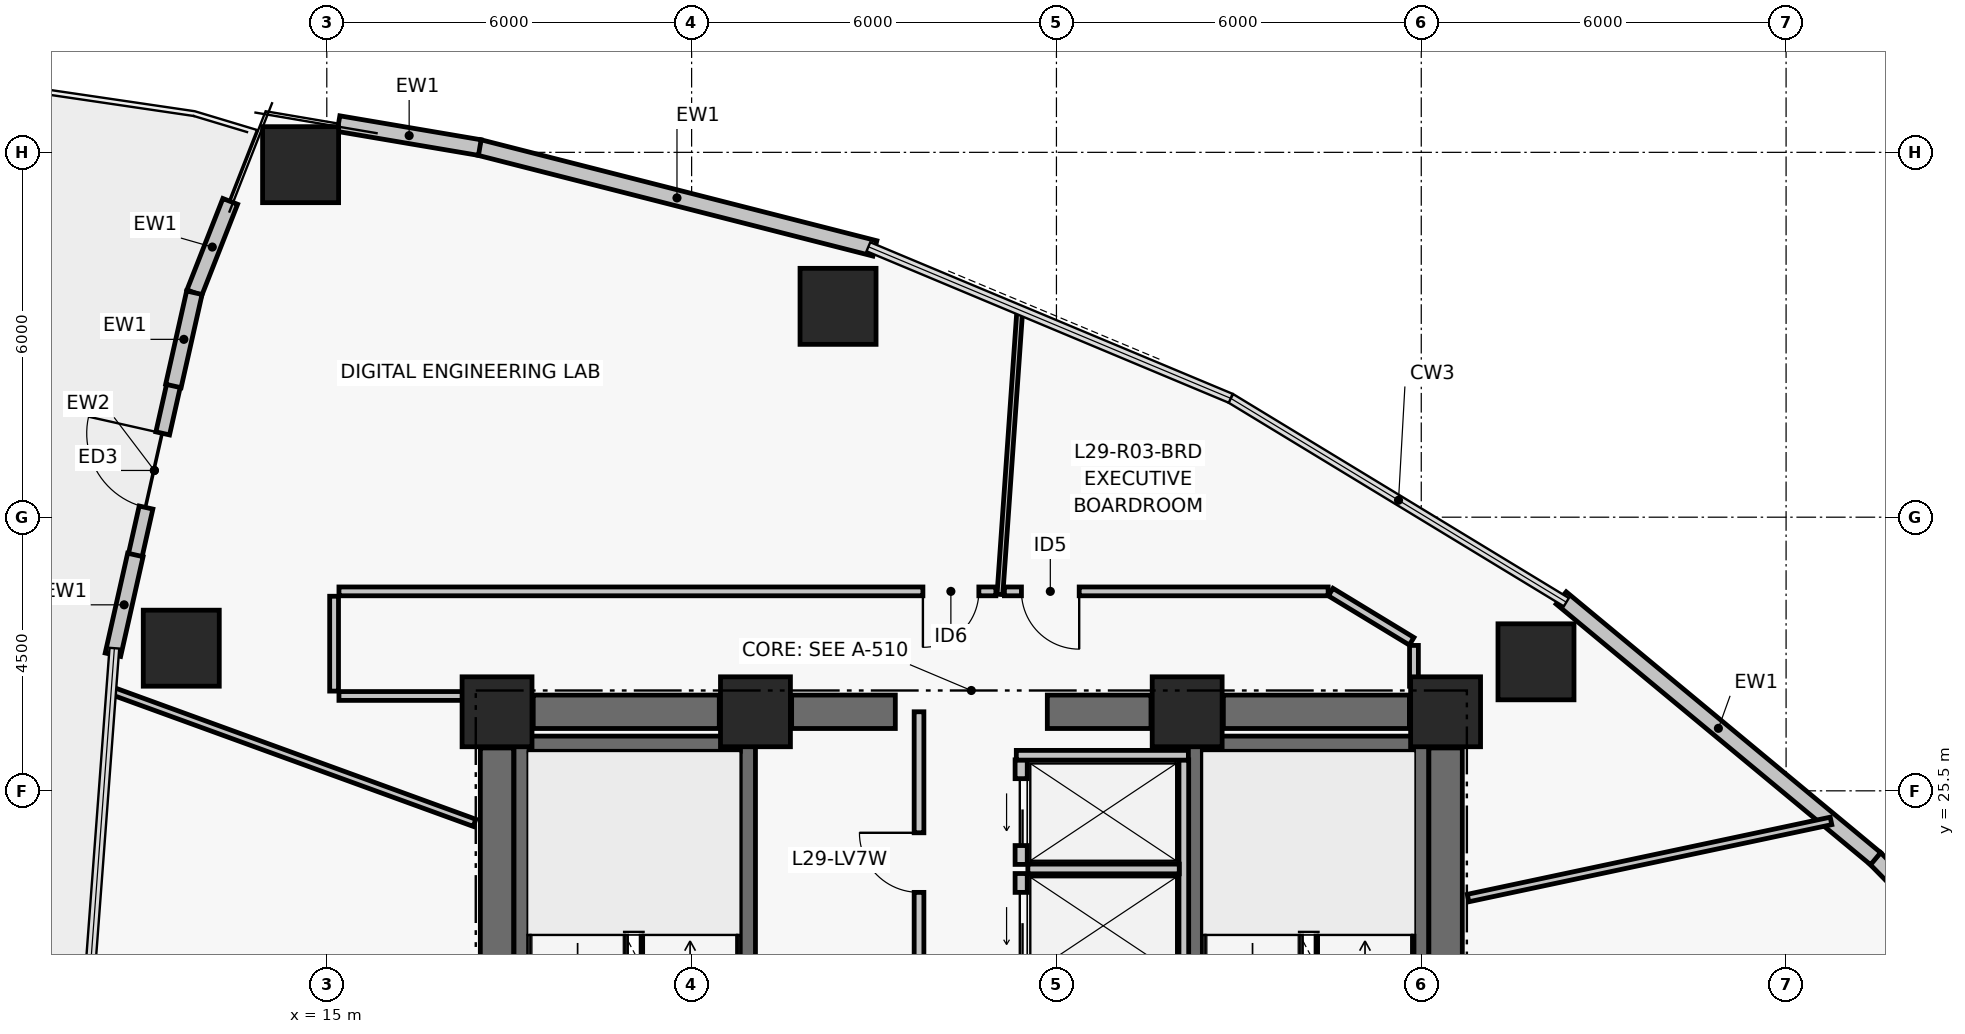
"""IFC4 building model, lengths in metres.
Left out: names, types, materials, properties, quantities, classifications, styles, units other than length and angle.
Written with IfcOpenShell. Run it as: python <this file> out.ifc"""

import sys

from ifc_helpers import new_model, si_unit, direction, frame, frame_2d, origin, origin_2d, place, context, subcontext, project, spatial, rectangle, hollow_rectangle, extrude, element, fill, save


model = new_model("IFC4")
c1 = context("Model", 3, precision=1e-05, world=origin(), true_north=direction((0.0, 1.0)))
c2 = subcontext(c1, "Body", "Model", "MODEL_VIEW")
j1 = project(units=[si_unit("LENGTHUNIT", "METRE"), si_unit("PLANEANGLEUNIT", "RADIAN")], contexts=[c1])
p1 = place(None, origin())
s1 = spatial("IfcSite", under=j1, at=p1, CompositionType="ELEMENT")
p2 = place(p1, origin())
s2 = spatial("IfcBuilding", under=s1, at=p2, CompositionType="ELEMENT")
p3 = place(p2, frame((0.0, 0.0, 118.86)))
s3 = spatial("IfcBuildingStorey", under=s2, at=p3, CompositionType="ELEMENT", Elevation=118.86)
for number, where, z_axis, x_axis in (
    (1, (17.8, 26.8, 0.0), (0.0, 0.0, 1.0), (1.0, 0.0, 0.0)),
    (2, (22.05, 26.8, 0.0), (0.0, 0.0, 1.0), (1.0, 0.0, 0.0)),
    (3, (29.15, 26.8, 0.0), (0.0, 0.0, 1.0), (1.0, 0.0, 0.0)),
    (4, (33.4, 26.8, 0.0), (0.0, 0.0, 1.0), (1.0, 0.0, 0.0)),
):
    element("IfcColumn", number, at=place(p3, frame(where, z_axis=z_axis, x_axis=x_axis)), inside=s3, PredefinedType="COLUMN", context=c2, shape_type="SweptSolid", body=[
        extrude(rectangle(XDim=1.15, YDim=1.15, at=origin_2d()), origin(), (0.0, 0.0, 1.0), 3.72),
    ])
p4 = place(p3, frame((18.395, 26.8, 0.0), z_axis=(0.0, 0.0, 1.0), x_axis=(1.0, 0.0, 0.0)))
e5 = element("IfcWall", 5, at=p4, inside=s3, PredefinedType="SHEAR", context=c2, shape_type="SweptSolid", body=[
    extrude(rectangle(XDim=3.06, YDim=0.55, at=frame_2d((1.53, 0.0))), origin(), (0.0, 0.0, 1.0), 3.47),
])
p5 = place(p3, frame((22.645, 26.8, 0.0), z_axis=(0.0, 0.0, 1.0), x_axis=(1.0, 0.0, 0.0)))
e6 = element("IfcWall", 6, at=p5, inside=s3, PredefinedType="SHEAR", context=c2, shape_type="SweptSolid", body=[
    extrude(rectangle(XDim=1.705, YDim=0.55, at=frame_2d((0.853, 0.0))), origin(), (0.0, 0.0, 1.0), 3.47),
])
p6 = place(p3, frame((26.85, 26.8, 0.0), z_axis=(0.0, 0.0, 1.0), x_axis=(1.0, 0.0, 0.0)))
e7 = element("IfcWall", 7, at=p6, inside=s3, PredefinedType="SHEAR", context=c2, shape_type="SweptSolid", body=[
    extrude(rectangle(XDim=1.705, YDim=0.55, at=frame_2d((0.853, 0.0))), origin(), (0.0, 0.0, 1.0), 3.47),
])
p7 = place(p3, frame((29.745, 26.8, 0.0), z_axis=(0.0, 0.0, 1.0), x_axis=(1.0, 0.0, 0.0)))
e8 = element("IfcWall", 8, at=p7, inside=s3, PredefinedType="SHEAR", context=c2, shape_type="SweptSolid", body=[
    extrude(rectangle(XDim=3.06, YDim=0.55, at=frame_2d((1.53, 0.0))), origin(), (0.0, 0.0, 1.0), 3.47),
])
for number, where, z_axis, x_axis in (
    (9, (17.8, 17.795, 0.0), (0.0, 0.0, 1.0), (0.0, 1.0, 0.0)),
    (10, (33.4, 17.795, 0.0), (0.0, 0.0, 1.0), (0.0, 1.0, 0.0)),
):
    element("IfcWall", number, at=place(p3, frame(where, z_axis=z_axis, x_axis=x_axis)), inside=s3, PredefinedType="SHEAR", context=c2, shape_type="SweptSolid", body=[
        extrude(rectangle(XDim=8.41, YDim=0.55, at=frame_2d((4.205, 0.0))), origin(), (0.0, 0.0, 1.0), 3.47),
    ])
p8 = place(p3, frame((18.204, 17.6, 0.0), z_axis=(0.0, 0.0, 1.0), x_axis=(0.0, 1.0, 0.0)))
e11 = element("IfcWall", 11, at=p8, inside=s3, PredefinedType="SHEAR", context=c2, shape_type="SweptSolid", body=[
    extrude(rectangle(XDim=8.8, YDim=0.25, at=frame_2d((4.4, 0.0))), origin(), (0.0, 0.0, 1.0), 3.47),
])
p9 = place(p3, frame((21.925, 17.6, 0.0), z_axis=(0.0, 0.0, 1.0), x_axis=(0.0, 1.0, 0.0)))
e12 = element("IfcWall", 12, at=p9, inside=s3, PredefinedType="SHEAR", context=c2, shape_type="SweptSolid", body=[
    extrude(rectangle(XDim=8.8, YDim=0.25, at=frame_2d((4.4, 0.0))), origin(), (0.0, 0.0, 1.0), 3.47),
])
p10 = place(p9, frame((0.35, 0.0, 0.0)))
e13 = element("IfcOpeningElement", 13, at=p10, cuts=e12, PredefinedType="OPENING", context=c2, shape_type="SweptSolid", body=[
    extrude(rectangle(XDim=1.05, YDim=2.08, at=frame_2d((0.525, 1.04))), frame((0.0, 0.135, 0.0), z_axis=(0.0, -1.0, 0.0), x_axis=(1.0, 0.0, 0.0)), (0.0, 0.0, 1.0), 0.27),
])
p11 = place(p3, frame((18.329, 26.275, 0.0), z_axis=(0.0, 0.0, 1.0), x_axis=(1.0, 0.0, 0.0)))
e14 = element("IfcWall", 14, at=p11, inside=s3, PredefinedType="SHEAR", context=c2, shape_type="SweptSolid", body=[
    extrude(rectangle(XDim=3.471, YDim=0.25, at=frame_2d((1.735, 0.0))), origin(), (0.0, 0.0, 1.0), 3.47),
])
p12 = place(p3, frame((29.275, 17.6, 0.0), z_axis=(0.0, 0.0, 1.0), x_axis=(0.0, 1.0, 0.0)))
e15 = element("IfcWall", 15, at=p12, inside=s3, PredefinedType="SHEAR", context=c2, shape_type="SweptSolid", body=[
    extrude(rectangle(XDim=8.8, YDim=0.25, at=frame_2d((4.4, 0.0))), origin(), (0.0, 0.0, 1.0), 3.47),
])
p13 = place(p12, frame((0.35, 0.0, 0.0)))
e16 = element("IfcOpeningElement", 16, at=p13, cuts=e15, PredefinedType="OPENING", context=c2, shape_type="SweptSolid", body=[
    extrude(rectangle(XDim=1.05, YDim=2.08, at=frame_2d((0.525, 1.04))), frame((0.0, 0.135, 0.0), z_axis=(0.0, -1.0, 0.0), x_axis=(1.0, 0.0, 0.0)), (0.0, 0.0, 1.0), 0.27),
])
p14 = place(p3, frame((32.996, 17.6, 0.0), z_axis=(0.0, 0.0, 1.0), x_axis=(0.0, 1.0, 0.0)))
e17 = element("IfcWall", 17, at=p14, inside=s3, PredefinedType="SHEAR", context=c2, shape_type="SweptSolid", body=[
    extrude(rectangle(XDim=8.8, YDim=0.25, at=frame_2d((4.4, 0.0))), origin(), (0.0, 0.0, 1.0), 3.47),
])
p15 = place(p3, frame((29.4, 26.275, 0.0), z_axis=(0.0, 0.0, 1.0), x_axis=(1.0, 0.0, 0.0)))
e18 = element("IfcWall", 18, at=p15, inside=s3, PredefinedType="SHEAR", context=c2, shape_type="SweptSolid", body=[
    extrude(rectangle(XDim=3.471, YDim=0.25, at=frame_2d((1.736, 0.0))), origin(), (0.0, 0.0, 1.0), 3.47),
])
for number, where, z_axis, x_axis in (
    (19, (34.887, 27.622, 0.0), (0.0, 0.0, 1.0), (1.0, 0.0, 0.0)),
    (20, (23.408, 33.467, 0.0), (0.0, 0.0, 1.0), (1.0, 0.0, 0.0)),
    (21, (14.569, 35.797, 0.0), (0.0, 0.0, 1.0), (1.0, 0.0, 0.0)),
    (22, (12.607, 27.846, 0.0), (0.0, 0.0, 1.0), (1.0, 0.0, 0.0)),
):
    element("IfcColumn", number, at=place(p3, frame(where, z_axis=z_axis, x_axis=x_axis)), inside=s3, PredefinedType="COLUMN", context=c2, shape_type="SweptSolid", body=[
        extrude(hollow_rectangle(XDim=1.25, YDim=1.25, WallThickness=0.05, at=origin_2d()), origin(), (0.0, 0.0, 1.0), 3.72),
    ])
p16 = place(p3, frame((11.849, 29.368, 0.0), z_axis=(0.0, 0.0, 1.0), x_axis=(0.219504103435, 0.975611576692, 0.0)))
e23 = element("IfcWall", 23, at=p16, inside=s3, PredefinedType="PARTITIONING", context=c2, shape_type="SweptSolid", body=[
    extrude(rectangle(XDim=2.872, YDim=0.23, at=frame_2d((1.436, 0.0))), origin(), (0.0, 0.0, 1.0), 3.47),
])
p17 = place(p16, frame((0.811, 0.0, 0.0)))
e24 = element("IfcOpeningElement", 24, at=p17, cuts=e23, PredefinedType="OPENING", context=c2, shape_type="SweptSolid", body=[
    extrude(rectangle(XDim=1.25, YDim=2.1, at=frame_2d((0.625, 1.05))), frame((0.0, 0.125, 0.0), z_axis=(0.0, -1.0, 0.0), x_axis=(1.0, 0.0, 0.0)), (0.0, 0.0, 1.0), 0.25),
])
p18 = place(p3, frame((40.463, 24.392, 0.0), z_axis=(0.0, 0.0, 1.0), x_axis=(0.700603293449, -0.713550996922, 0.0)))
e25 = element("IfcWall", 25, at=p18, inside=s3, PredefinedType="PARTITIONING", context=c2, shape_type="SweptSolid", body=[
    extrude(rectangle(XDim=2.395, YDim=0.26, at=frame_2d((1.197, 0.0))), origin(), (0.0, 0.0, 1.0), 3.47),
])
p19 = place(p3, frame((35.301, 28.672, 0.0), z_axis=(0.0, 0.0, 1.0), x_axis=(0.76975316947, -0.638341646841, 0.0)))
e26 = element("IfcWall", 26, at=p19, inside=s3, PredefinedType="PARTITIONING", context=c2, shape_type="SweptSolid", body=[
    extrude(rectangle(XDim=6.718, YDim=0.26, at=frame_2d((3.359, 0.0))), origin(), (0.0, 0.0, 1.0), 3.47),
])
p20 = place(p3, frame((17.505, 36.081, 0.0), z_axis=(0.0, 0.0, 1.0), x_axis=(0.968981437296, -0.247133514876, 0.0)))
e27 = element("IfcWall", 27, at=p20, inside=s3, PredefinedType="PARTITIONING", context=c2, shape_type="SweptSolid", body=[
    extrude(rectangle(XDim=6.718, YDim=0.26, at=frame_2d((3.359, 0.0))), origin(), (0.0, 0.0, 1.0), 3.47),
])
p21 = place(p3, frame((15.193, 36.472, 0.0), z_axis=(0.0, 0.0, 1.0), x_axis=(0.985905269947, -0.167304508875, 0.0)))
e28 = element("IfcWall", 28, at=p21, inside=s3, PredefinedType="PARTITIONING", context=c2, shape_type="SweptSolid", body=[
    extrude(rectangle(XDim=2.357, YDim=0.26, at=frame_2d((1.178, 0.0))), origin(), (0.0, 0.0, 1.0), 3.47),
])
p22 = place(p3, frame((12.822, 33.691, 0.0), z_axis=(0.0, 0.0, 1.0), x_axis=(0.365488551504, 0.930815835018, 0.0)))
e29 = element("IfcWall", 29, at=p22, inside=s3, PredefinedType="PARTITIONING", context=c2, shape_type="SweptSolid", body=[
    extrude(rectangle(XDim=1.614, YDim=0.26, at=frame_2d((0.807, 0.0))), origin(), (0.0, 0.0, 1.0), 3.47),
])
p23 = place(p3, frame((12.477, 32.158, 0.0), z_axis=(0.0, 0.0, 1.0), x_axis=(0.219593493325, 0.975591460443, 0.0)))
e30 = element("IfcWall", 30, at=p23, inside=s3, PredefinedType="PARTITIONING", context=c2, shape_type="SweptSolid", body=[
    extrude(rectangle(XDim=1.572, YDim=0.26, at=frame_2d((0.786, 0.0))), origin(), (0.0, 0.0, 1.0), 3.47),
])
p24 = place(p3, frame((11.482, 27.738, 0.0), z_axis=(0.0, 0.0, 1.0), x_axis=(0.219588171952, 0.975592658203, 0.0)))
e31 = element("IfcWall", 31, at=p24, inside=s3, PredefinedType="PARTITIONING", context=c2, shape_type="SweptSolid", body=[
    extrude(rectangle(XDim=1.682, YDim=0.26, at=frame_2d((0.841, 0.0))), origin(), (0.0, 0.0, 1.0), 3.47),
])
p25 = place(p3, frame((26.42, 22.42, 0.0), z_axis=(0.0, 0.0, 1.0), x_axis=(0.0, 1.0, 0.0)))
e32 = element("IfcWall", 32, at=p25, inside=s3, PredefinedType="PARTITIONING", context=c2, shape_type="SweptSolid", body=[
    extrude(rectangle(XDim=1.72, YDim=0.2, at=frame_2d((0.86, 0.0))), origin(), (0.0, 0.0, 1.0), 3.47),
])
p26 = place(p25, frame((0.31, 0.0, 0.0)))
e33 = element("IfcOpeningElement", 33, at=p26, cuts=e32, PredefinedType="OPENING", context=c2, shape_type="SweptSolid", body=[
    extrude(rectangle(XDim=1.1, YDim=2.08, at=frame_2d((0.55, 1.04))), frame((0.0, 0.11, 0.0), z_axis=(0.0, -1.0, 0.0), x_axis=(1.0, 0.0, 0.0)), (0.0, 0.0, 1.0), 0.22),
])
p27 = place(p3, frame((26.42, 24.29, 0.0), z_axis=(0.0, 0.0, 1.0), x_axis=(0.0, 1.0, 0.0)))
e34 = element("IfcWall", 34, at=p27, inside=s3, PredefinedType="PARTITIONING", context=c2, shape_type="SweptSolid", body=[
    extrude(rectangle(XDim=1.72, YDim=0.2, at=frame_2d((0.86, 0.0))), origin(), (0.0, 0.0, 1.0), 3.47),
])
p28 = place(p27, frame((0.31, 0.0, 0.0)))
e35 = element("IfcOpeningElement", 35, at=p28, cuts=e34, PredefinedType="OPENING", context=c2, shape_type="SweptSolid", body=[
    extrude(rectangle(XDim=1.1, YDim=2.08, at=frame_2d((0.55, 1.04))), frame((0.0, 0.11, 0.0), z_axis=(0.0, -1.0, 0.0), x_axis=(1.0, 0.0, 0.0)), (0.0, 0.0, 1.0), 0.22),
])
p29 = place(p3, frame((29.095, 20.56, 0.0), z_axis=(0.0, 0.0, 1.0), x_axis=(0.0, 1.0, 0.0)))
e36 = element("IfcWall", 36, at=p29, inside=s3, PredefinedType="PARTITIONING", context=c2, shape_type="SweptSolid", body=[
    extrude(rectangle(XDim=5.45, YDim=0.16, at=frame_2d((2.725, 0.0))), origin(), (0.0, 0.0, 1.0), 3.47),
])
p30 = place(p3, frame((26.53, 24.215, 0.0), z_axis=(0.0, 0.0, 1.0), x_axis=(1.0, 0.0, 0.0)))
e37 = element("IfcWall", 37, at=p30, inside=s3, PredefinedType="PARTITIONING", context=c2, shape_type="SweptSolid", body=[
    extrude(rectangle(XDim=2.49, YDim=0.16, at=frame_2d((1.245, 0.0))), origin(), (0.0, 0.0, 1.0), 3.47),
])
p31 = place(p3, frame((26.34, 26.085, 0.0), z_axis=(0.0, 0.0, 1.0), x_axis=(1.0, 0.0, 0.0)))
e38 = element("IfcWall", 38, at=p31, inside=s3, PredefinedType="PARTITIONING", context=c2, shape_type="SweptSolid", body=[
    extrude(rectangle(XDim=2.83, YDim=0.16, at=frame_2d((1.415, 0.0))), origin(), (0.0, 0.0, 1.0), 3.47),
])
p32 = place(p3, frame((24.74, 22.43, 0.0), z_axis=(0.0, 0.0, 1.0), x_axis=(0.0, 1.0, 0.0)))
e39 = element("IfcWall", 39, at=p32, inside=s3, PredefinedType="PARTITIONING", context=c2, shape_type="SweptSolid", body=[
    extrude(rectangle(XDim=4.37, YDim=0.16, at=frame_2d((2.185, 0.0))), origin(), (0.0, 0.0, 1.0), 2.6),
])
p33 = place(p32, frame((1.4, 0.0, 0.0)))
e40 = element("IfcOpeningElement", 40, at=p33, cuts=e39, PredefinedType="OPENING", context=c2, shape_type="SweptSolid", body=[
    extrude(rectangle(XDim=0.98, YDim=2.06, at=frame_2d((0.49, 1.03))), frame((0.0, 0.09, 0.0), z_axis=(0.0, -1.0, 0.0), x_axis=(1.0, 0.0, 0.0)), (0.0, 0.0, 1.0), 0.18),
])
p34 = place(p3, frame((33.74, 27.22, 0.0), z_axis=(0.0, 0.0, 1.0), x_axis=(-1.0, 0.0, 0.0)))
e41 = element("IfcWall", 41, at=p34, inside=s3, PredefinedType="PARTITIONING", context=c2, shape_type="SweptSolid", body=[
    extrude(rectangle(XDim=0.86, YDim=0.145, at=frame_2d((0.43, 0.0))), origin(), (0.0, 0.0, 1.0), 2.6),
])
p35 = place(p3, frame((32.88, 27.22, 0.0), z_axis=(0.0, 0.0, 1.0), x_axis=(0.0, 1.0, 0.0)))
e42 = element("IfcWall", 42, at=p35, inside=s3, PredefinedType="PARTITIONING", context=c2, shape_type="SweptSolid", body=[
    extrude(rectangle(XDim=0.671, YDim=0.145, at=frame_2d((0.335, 0.0))), origin(), (0.0, 0.0, 1.0), 2.6),
])
p36 = place(p3, frame((32.842, 27.96, 0.0), z_axis=(0.0, 0.0, 1.0), x_axis=(-0.854742818792, 0.519051744745, 0.0)))
e43 = element("IfcWall", 43, at=p36, inside=s3, PredefinedType="PARTITIONING", context=c2, shape_type="SweptSolid", body=[
    extrude(rectangle(XDim=1.558, YDim=0.145, at=frame_2d((0.779, 0.0))), origin(), (0.0, 0.0, 1.0), 3.05),
])
p37 = place(p3, frame((31.469, 28.78, 0.0), z_axis=(0.0, 0.0, 1.0), x_axis=(-1.0, 0.0, 0.0)))
e44 = element("IfcWall", 44, at=p37, inside=s3, PredefinedType="PARTITIONING", context=c2, shape_type="SweptSolid", body=[
    extrude(rectangle(XDim=5.324, YDim=0.145, at=frame_2d((2.662, 0.0))), origin(), (0.0, 0.0, 1.0), 3.05),
])
p38 = place(p37, frame((4.094, 0.0, 0.0)))
e45 = element("IfcOpeningElement", 45, at=p38, cuts=e44, PredefinedType="OPENING", context=c2, shape_type="SweptSolid", body=[
    extrude(rectangle(XDim=0.95, YDim=2.06, at=frame_2d((0.475, 1.03))), frame((0.0, 0.083, 0.0), z_axis=(0.0, -1.0, 0.0), x_axis=(1.0, 0.0, 0.0)), (0.0, 0.0, 1.0), 0.165),
])
p39 = place(p3, frame((26.004, 28.78, 0.0), z_axis=(0.0, 0.0, 1.0), x_axis=(-1.0, 0.0, 0.0)))
e46 = element("IfcWall", 46, at=p39, inside=s3, PredefinedType="PARTITIONING", context=c2, shape_type="SweptSolid", body=[
    extrude(rectangle(XDim=10.804, YDim=0.145, at=frame_2d((5.402, 0.0))), origin(), (0.0, 0.0, 1.0), 2.65),
])
p40 = place(p39, frame((0.28, 0.0, 0.0)))
e47 = element("IfcOpeningElement", 47, at=p40, cuts=e46, PredefinedType="OPENING", context=c2, shape_type="SweptSolid", body=[
    extrude(rectangle(XDim=0.92, YDim=2.05, at=frame_2d((0.46, 1.025))), frame((0.0, 0.083, 0.0), z_axis=(0.0, -1.0, 0.0), x_axis=(1.0, 0.0, 0.0)), (0.0, 0.0, 1.0), 0.165),
])
p41 = place(p3, frame((15.12, 28.7, 0.0), z_axis=(0.0, 0.0, 1.0), x_axis=(0.0, -1.0, 0.0)))
e48 = element("IfcWall", 48, at=p41, inside=s3, PredefinedType="PARTITIONING", context=c2, shape_type="SweptSolid", body=[
    extrude(rectangle(XDim=1.56, YDim=0.145, at=frame_2d((0.78, 0.0))), origin(), (0.0, 0.0, 1.0), 2.65),
])
p42 = place(p3, frame((15.2, 27.06, 0.0), z_axis=(0.0, 0.0, 1.0), x_axis=(1.0, 0.0, 0.0)))
e49 = element("IfcWall", 49, at=p42, inside=s3, PredefinedType="PARTITIONING", context=c2, shape_type="SweptSolid", body=[
    extrude(rectangle(XDim=2.18, YDim=0.145, at=frame_2d((1.09, 0.0))), origin(), (0.0, 0.0, 1.0), 2.65),
])
p43 = place(p3, frame((33.77, 23.737, 0.0), z_axis=(0.0, 0.0, 1.0), x_axis=(0.978144206175, 0.20792766032, 0.0)))
e50 = element("IfcWall", 50, at=p43, inside=s3, PredefinedType="PARTITIONING", context=c2, shape_type="SweptSolid", body=[
    extrude(rectangle(XDim=6.102, YDim=0.125, at=frame_2d((3.051, 0.0))), origin(), (0.0, 0.0, 1.0), 2.6),
])
p44 = place(p3, frame((26.071, 28.73, 0.0), z_axis=(0.0, 0.0, 1.0), x_axis=(0.069740179431, 0.997565189535, 0.0)))
e51 = element("IfcWall", 51, at=p44, inside=s3, PredefinedType="PARTITIONING", context=c2, shape_type="SweptSolid", body=[
    extrude(rectangle(XDim=4.698, YDim=0.095, at=frame_2d((2.349, 0.0))), origin(), (0.0, 0.0, 1.0), 2.9),
])
p45 = place(p3, frame((17.43, 24.974, 0.0), z_axis=(0.0, 0.0, 1.0), x_axis=(-0.939693782006, 0.342016952882, 0.0)))
e52 = element("IfcWall", 52, at=p45, inside=s3, PredefinedType="PARTITIONING", context=c2, shape_type="SweptSolid", body=[
    extrude(rectangle(XDim=6.369, YDim=0.125, at=frame_2d((3.185, 0.0))), origin(), (0.0, 0.0, 1.0), 2.6),
])
p46 = place(p17, origin())
e53 = element("IfcDoor", 53, at=p46, inside=s3, OperationType="SINGLE_SWING_RIGHT", PredefinedType="DOOR", context=c2, shape_type="SweptSolid", body=[
    extrude(rectangle(XDim=1.25, YDim=2.1, at=frame_2d((0.625, 1.05))), frame((0.0, 0.025, 0.0), z_axis=(0.0, -1.0, 0.0), x_axis=(1.0, 0.0, 0.0)), (0.0, 0.0, 1.0), 0.05),
])
fill(e24, e53)
p47 = place(p26, origin())
e54 = element("IfcDoor", 54, at=p47, inside=s3, OperationType="DOUBLE_DOOR_SLIDING", PredefinedType="DOOR", context=c2, shape_type="SweptSolid", body=[
    extrude(rectangle(XDim=1.1, YDim=2.08, at=frame_2d((0.55, 1.04))), frame((0.0, 0.025, 0.0), z_axis=(0.0, -1.0, 0.0), x_axis=(1.0, 0.0, 0.0)), (0.0, 0.0, 1.0), 0.05),
])
fill(e33, e54)
p48 = place(p28, origin())
e55 = element("IfcDoor", 55, at=p48, inside=s3, OperationType="DOUBLE_DOOR_SLIDING", PredefinedType="DOOR", context=c2, shape_type="SweptSolid", body=[
    extrude(rectangle(XDim=1.1, YDim=2.08, at=frame_2d((0.55, 1.04))), frame((0.0, 0.025, 0.0), z_axis=(0.0, -1.0, 0.0), x_axis=(1.0, 0.0, 0.0)), (0.0, 0.0, 1.0), 0.05),
])
fill(e35, e55)
p49 = place(p33, origin())
e56 = element("IfcDoor", 56, at=p49, inside=s3, OperationType="SINGLE_SWING_RIGHT", PredefinedType="DOOR", context=c2, shape_type="SweptSolid", body=[
    extrude(rectangle(XDim=0.98, YDim=2.06, at=frame_2d((0.49, 1.03))), frame((0.0, 0.025, 0.0), z_axis=(0.0, -1.0, 0.0), x_axis=(1.0, 0.0, 0.0)), (0.0, 0.0, 1.0), 0.05),
])
fill(e40, e56)
p50 = place(p38, origin())
e57 = element("IfcDoor", 57, at=p50, inside=s3, OperationType="SINGLE_SWING_LEFT", PredefinedType="DOOR", context=c2, shape_type="SweptSolid", body=[
    extrude(rectangle(XDim=0.95, YDim=2.06, at=frame_2d((0.475, 1.03))), frame((0.0, 0.025, 0.0), z_axis=(0.0, -1.0, 0.0), x_axis=(1.0, 0.0, 0.0)), (0.0, 0.0, 1.0), 0.05),
])
fill(e45, e57)
p51 = place(p40, origin())
e58 = element("IfcDoor", 58, at=p51, inside=s3, OperationType="SINGLE_SWING_RIGHT", PredefinedType="DOOR", context=c2, shape_type="SweptSolid", body=[
    extrude(rectangle(XDim=0.92, YDim=2.05, at=frame_2d((0.46, 1.025))), frame((0.0, 0.025, 0.0), z_axis=(0.0, -1.0, 0.0), x_axis=(1.0, 0.0, 0.0)), (0.0, 0.0, 1.0), 0.05),
])
fill(e47, e58)
save(model, sys.argv[1])
